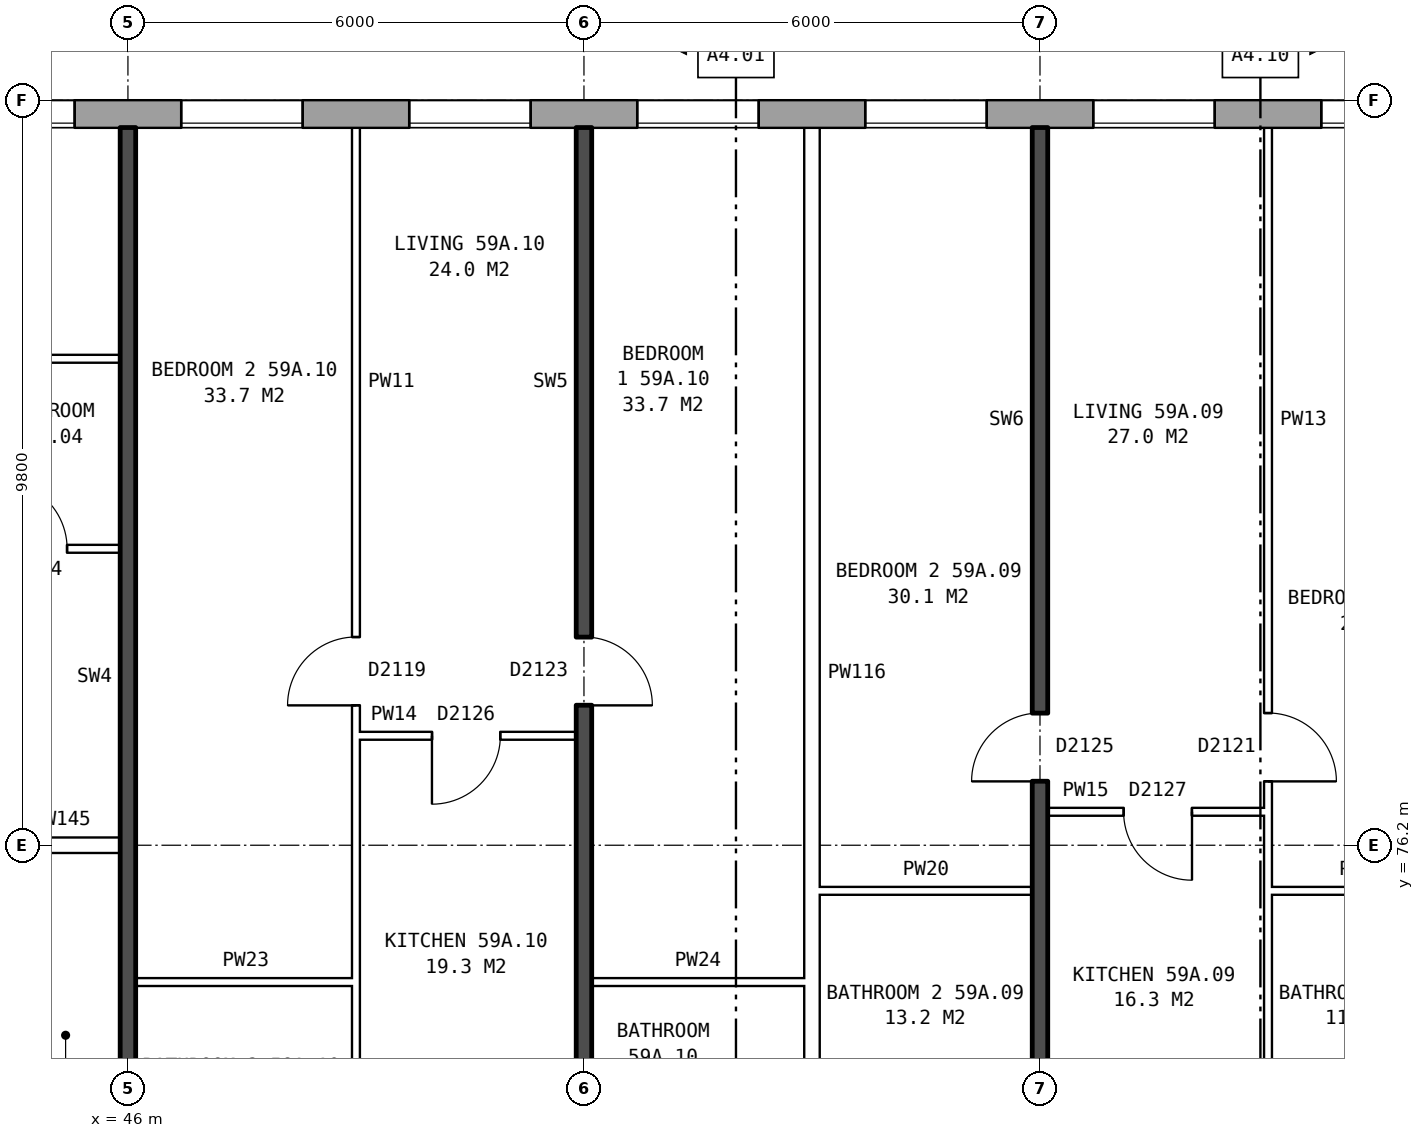
"""IFC4 building model, lengths in metres.
Left out: names, types, materials, properties, quantities, classifications, styles, units other than length and angle.
Written with IfcOpenShell. Run it as: python <this file> out.ifc"""

import sys

from ifc_helpers import new_model, si_unit, direction, frame, frame_2d, origin, place, context, subcontext, project, spatial, rectangle, extrude, element, fill, save


model = new_model("IFC4")
c1 = context("Model", 3, precision=1e-05, world=origin(), true_north=direction((0.0, 1.0)))
c2 = subcontext(c1, "Body", "Model", "MODEL_VIEW")
j1 = project(units=[si_unit("LENGTHUNIT", "METRE"), si_unit("PLANEANGLEUNIT", "RADIAN")], contexts=[c1])
p1 = place(None, origin())
s1 = spatial("IfcSite", under=j1, at=p1, CompositionType="ELEMENT")
p2 = place(p1, origin())
s2 = spatial("IfcBuilding", under=s1, at=p2, CompositionType="ELEMENT")
p3 = place(p2, frame((0.0, 0.0, 209.0)))
s3 = spatial("IfcBuildingStorey", under=s2, at=p3, CompositionType="ELEMENT", Elevation=209.0)
p4 = place(p3, frame((74.95, 85.82, 0.0), z_axis=(0.0, 0.0, 1.0), x_axis=(-1.0, 0.0, 0.0)))
e1 = element("IfcWall", 1, at=p4, inside=s3, PredefinedType="STANDARD", context=c2, shape_type="SweptSolid", body=[
    extrude(rectangle(XDim=39.875, YDim=0.36, at=frame_2d((19.938, 0.0))), origin(), (0.0, 0.0, 1.0), 2.85),
])
p5 = place(p4, frame((0.3, 0.0, 0.8)))
e2 = element("IfcOpeningElement", 2, at=p5, cuts=e1, PredefinedType="OPENING", context=c2, shape_type="SweptSolid", body=[
    extrude(rectangle(XDim=0.8, YDim=1.5, at=frame_2d((0.4, 0.75))), frame((0.0, 0.19, 0.0), z_axis=(0.0, -1.0, 0.0), x_axis=(1.0, 0.0, 0.0)), (0.0, 0.0, 1.0), 0.38),
])
p6 = place(p4, frame((5.65, 0.0, 0.8)))
e3 = element("IfcOpeningElement", 3, at=p6, cuts=e1, PredefinedType="OPENING", context=c2, shape_type="SweptSolid", body=[
    extrude(rectangle(XDim=1.6, YDim=1.8, at=frame_2d((0.8, 0.9))), frame((0.0, 0.19, 0.0), z_axis=(0.0, -1.0, 0.0), x_axis=(1.0, 0.0, 0.0)), (0.0, 0.0, 1.0), 0.38),
])
p7 = place(p4, frame((8.65, 0.0, 0.8)))
e4 = element("IfcOpeningElement", 4, at=p7, cuts=e1, PredefinedType="OPENING", context=c2, shape_type="SweptSolid", body=[
    extrude(rectangle(XDim=1.6, YDim=1.8, at=frame_2d((0.8, 0.9))), frame((0.0, 0.19, 0.0), z_axis=(0.0, -1.0, 0.0), x_axis=(1.0, 0.0, 0.0)), (0.0, 0.0, 1.0), 0.38),
])
p8 = place(p4, frame((11.65, 0.0, 0.8)))
e5 = element("IfcOpeningElement", 5, at=p8, cuts=e1, PredefinedType="OPENING", context=c2, shape_type="SweptSolid", body=[
    extrude(rectangle(XDim=1.6, YDim=1.8, at=frame_2d((0.8, 0.9))), frame((0.0, 0.19, 0.0), z_axis=(0.0, -1.0, 0.0), x_axis=(1.0, 0.0, 0.0)), (0.0, 0.0, 1.0), 0.38),
])
p9 = place(p4, frame((14.65, 0.0, 0.8)))
e6 = element("IfcOpeningElement", 6, at=p9, cuts=e1, PredefinedType="OPENING", context=c2, shape_type="SweptSolid", body=[
    extrude(rectangle(XDim=1.6, YDim=1.8, at=frame_2d((0.8, 0.9))), frame((0.0, 0.19, 0.0), z_axis=(0.0, -1.0, 0.0), x_axis=(1.0, 0.0, 0.0)), (0.0, 0.0, 1.0), 0.38),
])
p10 = place(p4, frame((17.65, 0.0, 0.8)))
e7 = element("IfcOpeningElement", 7, at=p10, cuts=e1, PredefinedType="OPENING", context=c2, shape_type="SweptSolid", body=[
    extrude(rectangle(XDim=1.6, YDim=1.8, at=frame_2d((0.8, 0.9))), frame((0.0, 0.19, 0.0), z_axis=(0.0, -1.0, 0.0), x_axis=(1.0, 0.0, 0.0)), (0.0, 0.0, 1.0), 0.38),
])
p11 = place(p4, frame((20.65, 0.0, 0.8)))
e8 = element("IfcOpeningElement", 8, at=p11, cuts=e1, PredefinedType="OPENING", context=c2, shape_type="SweptSolid", body=[
    extrude(rectangle(XDim=1.6, YDim=1.8, at=frame_2d((0.8, 0.9))), frame((0.0, 0.19, 0.0), z_axis=(0.0, -1.0, 0.0), x_axis=(1.0, 0.0, 0.0)), (0.0, 0.0, 1.0), 0.38),
])
p12 = place(p4, frame((23.65, 0.0, 0.8)))
e9 = element("IfcOpeningElement", 9, at=p12, cuts=e1, PredefinedType="OPENING", context=c2, shape_type="SweptSolid", body=[
    extrude(rectangle(XDim=1.6, YDim=1.8, at=frame_2d((0.8, 0.9))), frame((0.0, 0.19, 0.0), z_axis=(0.0, -1.0, 0.0), x_axis=(1.0, 0.0, 0.0)), (0.0, 0.0, 1.0), 0.38),
])
p13 = place(p4, frame((26.65, 0.0, 0.8)))
e10 = element("IfcOpeningElement", 10, at=p13, cuts=e1, PredefinedType="OPENING", context=c2, shape_type="SweptSolid", body=[
    extrude(rectangle(XDim=1.6, YDim=1.8, at=frame_2d((0.8, 0.9))), frame((0.0, 0.19, 0.0), z_axis=(0.0, -1.0, 0.0), x_axis=(1.0, 0.0, 0.0)), (0.0, 0.0, 1.0), 0.38),
])
p14 = place(p4, frame((29.65, 0.0, 0.8)))
e11 = element("IfcOpeningElement", 11, at=p14, cuts=e1, PredefinedType="OPENING", context=c2, shape_type="SweptSolid", body=[
    extrude(rectangle(XDim=1.6, YDim=1.8, at=frame_2d((0.8, 0.9))), frame((0.0, 0.19, 0.0), z_axis=(0.0, -1.0, 0.0), x_axis=(1.0, 0.0, 0.0)), (0.0, 0.0, 1.0), 0.38),
])
p15 = place(p4, frame((32.65, 0.0, 0.8)))
e12 = element("IfcOpeningElement", 12, at=p15, cuts=e1, PredefinedType="OPENING", context=c2, shape_type="SweptSolid", body=[
    extrude(rectangle(XDim=1.6, YDim=1.8, at=frame_2d((0.8, 0.9))), frame((0.0, 0.19, 0.0), z_axis=(0.0, -1.0, 0.0), x_axis=(1.0, 0.0, 0.0)), (0.0, 0.0, 1.0), 0.38),
])
p16 = place(p4, frame((35.15, 0.0, 0.8)))
e13 = element("IfcOpeningElement", 13, at=p16, cuts=e1, PredefinedType="OPENING", context=c2, shape_type="SweptSolid", body=[
    extrude(rectangle(XDim=1.0, YDim=1.8, at=frame_2d((0.5, 0.9))), frame((0.0, 0.19, 0.0), z_axis=(0.0, -1.0, 0.0), x_axis=(1.0, 0.0, 0.0)), (0.0, 0.0, 1.0), 0.38),
])
p17 = place(p4, frame((1.4, 0.0, 0.8)))
e14 = element("IfcOpeningElement", 14, at=p17, cuts=e1, PredefinedType="OPENING", context=c2, shape_type="SweptSolid", body=[
    extrude(rectangle(XDim=1.4, YDim=1.8, at=frame_2d((0.7, 0.9))), frame((0.0, 0.19, 0.0), z_axis=(0.0, -1.0, 0.0), x_axis=(1.0, 0.0, 0.0)), (0.0, 0.0, 1.0), 0.38),
])
p18 = place(p4, frame((38.55, 0.0, 0.8)))
e15 = element("IfcOpeningElement", 15, at=p18, cuts=e1, PredefinedType="OPENING", context=c2, shape_type="SweptSolid", body=[
    extrude(rectangle(XDim=1.0, YDim=1.8, at=frame_2d((0.5, 0.9))), frame((0.0, 0.19, 0.0), z_axis=(0.0, -1.0, 0.0), x_axis=(1.0, 0.0, 0.0)), (0.0, 0.0, 1.0), 0.38),
])
p19 = place(p3, frame((46.1, 74.4, 0.0), z_axis=(0.0, 0.0, 1.0), x_axis=(1.0, 0.0, 0.0)))
e16 = element("IfcWall", 16, at=p19, inside=s3, PredefinedType="PARTITIONING", context=c2, shape_type="SweptSolid", body=[
    extrude(rectangle(XDim=2.9, YDim=0.1, at=frame_2d((1.45, 0.0))), origin(), (0.0, 0.0, 1.0), 2.85),
])
for number, where, z_axis, x_axis in (
    (17, (52.1, 74.4, 0.0), (0.0, 0.0, 1.0), (1.0, 0.0, 0.0)),
    (18, (55.1, 75.6, 0.0), (0.0, 0.0, 1.0), (1.0, 0.0, 0.0)),
):
    element("IfcWall", number, at=place(p3, frame(where, z_axis=z_axis, x_axis=x_axis)), inside=s3, PredefinedType="PARTITIONING", context=c2, shape_type="SweptSolid", body=[
        extrude(rectangle(XDim=2.8, YDim=0.1, at=frame_2d((1.4, 0.0))), origin(), (0.0, 0.0, 1.0), 2.85),
    ])
p20 = place(p3, frame((61.0, 75.6, 0.0), z_axis=(0.0, 0.0, 1.0), x_axis=(1.0, 0.0, 0.0)))
e19 = element("IfcWall", 19, at=p20, inside=s3, PredefinedType="PARTITIONING", context=c2, shape_type="SweptSolid", body=[
    extrude(rectangle(XDim=2.64, YDim=0.1, at=frame_2d((1.32, 0.0))), origin(), (0.0, 0.0, 1.0), 2.85),
])
p21 = place(p3, frame((44.36, 76.2, 0.0), z_axis=(0.0, 0.0, 1.0), x_axis=(1.0, 0.0, 0.0)))
e20 = element("IfcWall", 20, at=p21, inside=s3, PredefinedType="PARTITIONING", context=c2, shape_type="SweptSolid", body=[
    extrude(rectangle(XDim=1.54, YDim=0.2, at=frame_2d((0.77, 0.0))), origin(), (0.0, 0.0, 1.0), 2.85),
])
p22 = place(p3, frame((58.1, 76.64, 0.0), z_axis=(0.0, 0.0, 1.0), x_axis=(1.0, 0.0, 0.0)))
e21 = element("IfcWall", 21, at=p22, inside=s3, PredefinedType="PARTITIONING", context=c2, shape_type="SweptSolid", body=[
    extrude(rectangle(XDim=2.9, YDim=0.1, at=frame_2d((1.45, 0.0))), origin(), (0.0, 0.0, 1.0), 2.85),
])
p23 = place(p22, frame((1.0, 0.0, 0.0)))
e22 = element("IfcOpeningElement", 22, at=p23, cuts=e21, PredefinedType="OPENING", context=c2, shape_type="SweptSolid", body=[
    extrude(rectangle(XDim=0.9, YDim=2.1, at=frame_2d((0.45, 1.05))), frame((0.0, 0.06, 0.0), z_axis=(0.0, -1.0, 0.0), x_axis=(1.0, 0.0, 0.0)), (0.0, 0.0, 1.0), 0.12),
])
p24 = place(p3, frame((49.0, 77.64, 0.0), z_axis=(0.0, 0.0, 1.0), x_axis=(1.0, 0.0, 0.0)))
e23 = element("IfcWall", 23, at=p24, inside=s3, PredefinedType="PARTITIONING", context=c2, shape_type="SweptSolid", body=[
    extrude(rectangle(XDim=2.9, YDim=0.1, at=frame_2d((1.45, 0.0))), origin(), (0.0, 0.0, 1.0), 2.85),
])
p25 = place(p24, frame((1.0, 0.0, 0.0)))
e24 = element("IfcOpeningElement", 24, at=p25, cuts=e23, PredefinedType="OPENING", context=c2, shape_type="SweptSolid", body=[
    extrude(rectangle(XDim=0.9, YDim=2.1, at=frame_2d((0.45, 1.05))), frame((0.0, 0.06, 0.0), z_axis=(0.0, -1.0, 0.0), x_axis=(1.0, 0.0, 0.0)), (0.0, 0.0, 1.0), 0.12),
])
p26 = place(p3, frame((40.1, 80.1, 0.0), z_axis=(0.0, 0.0, 1.0), x_axis=(1.0, 0.0, 0.0)))
e25 = element("IfcWall", 25, at=p26, inside=s3, PredefinedType="PARTITIONING", context=c2, shape_type="SweptSolid", body=[
    extrude(rectangle(XDim=5.8, YDim=0.1, at=frame_2d((2.9, 0.0))), origin(), (0.0, 0.0, 1.0), 2.85),
])
p27 = place(p26, frame((1.3, 0.0, 0.0)))
e26 = element("IfcOpeningElement", 26, at=p27, cuts=e25, PredefinedType="OPENING", context=c2, shape_type="SweptSolid", body=[
    extrude(rectangle(XDim=0.9, YDim=2.1, at=frame_2d((0.45, 1.05))), frame((0.0, 0.06, 0.0), z_axis=(0.0, -1.0, 0.0), x_axis=(1.0, 0.0, 0.0)), (0.0, 0.0, 1.0), 0.12),
])
p28 = place(p26, frame((4.2, 0.0, 0.0)))
e27 = element("IfcOpeningElement", 27, at=p28, cuts=e25, PredefinedType="OPENING", context=c2, shape_type="SweptSolid", body=[
    extrude(rectangle(XDim=0.9, YDim=2.1, at=frame_2d((0.45, 1.05))), frame((0.0, 0.06, 0.0), z_axis=(0.0, -1.0, 0.0), x_axis=(1.0, 0.0, 0.0)), (0.0, 0.0, 1.0), 0.12),
])
p29 = place(p3, frame((43.6, 82.6, 0.0), z_axis=(0.0, 0.0, 1.0), x_axis=(1.0, 0.0, 0.0)))
e28 = element("IfcWall", 28, at=p29, inside=s3, PredefinedType="PARTITIONING", context=c2, shape_type="SweptSolid", body=[
    extrude(rectangle(XDim=2.3, YDim=0.1, at=frame_2d((1.15, 0.0))), origin(), (0.0, 0.0, 1.0), 2.85),
])
p30 = place(p3, frame((46.0, 71.2, 0.0), z_axis=(0.0, 0.0, 1.0), x_axis=(0.0, 1.0, 0.0)))
e29 = element("IfcWall", 29, at=p30, inside=s3, PredefinedType="SOLIDWALL", context=c2, shape_type="SweptSolid", body=[
    extrude(rectangle(XDim=14.44, YDim=0.2, at=frame_2d((7.22, 0.0))), origin(), (0.0, 0.0, 1.0), 2.85),
])
p31 = place(p3, frame((49.0, 71.3, 0.0), z_axis=(0.0, 0.0, 1.0), x_axis=(0.0, 1.0, 0.0)))
e30 = element("IfcWall", 30, at=p31, inside=s3, PredefinedType="PARTITIONING", context=c2, shape_type="SweptSolid", body=[
    extrude(rectangle(XDim=14.34, YDim=0.1, at=frame_2d((7.17, 0.0))), origin(), (0.0, 0.0, 1.0), 2.85),
])
p32 = place(p31, frame((6.74, 0.0, 0.0)))
e31 = element("IfcOpeningElement", 31, at=p32, cuts=e30, PredefinedType="OPENING", context=c2, shape_type="SweptSolid", body=[
    extrude(rectangle(XDim=0.9, YDim=2.1, at=frame_2d((0.45, 1.05))), frame((0.0, 0.06, 0.0), z_axis=(0.0, -1.0, 0.0), x_axis=(1.0, 0.0, 0.0)), (0.0, 0.0, 1.0), 0.12),
])
p33 = place(p31, frame((0.4, 0.0, 0.0)))
e32 = element("IfcOpeningElement", 32, at=p33, cuts=e30, PredefinedType="OPENING", context=c2, shape_type="SweptSolid", body=[
    extrude(rectangle(XDim=0.9, YDim=2.1, at=frame_2d((0.45, 1.05))), frame((0.0, 0.06, 0.0), z_axis=(0.0, -1.0, 0.0), x_axis=(1.0, 0.0, 0.0)), (0.0, 0.0, 1.0), 0.12),
])
p34 = place(p3, frame((52.0, 71.2, 0.0), z_axis=(0.0, 0.0, 1.0), x_axis=(0.0, 1.0, 0.0)))
e33 = element("IfcWall", 33, at=p34, inside=s3, PredefinedType="SOLIDWALL", context=c2, shape_type="SweptSolid", body=[
    extrude(rectangle(XDim=14.44, YDim=0.2, at=frame_2d((7.22, 0.0))), origin(), (0.0, 0.0, 1.0), 2.85),
])
p35 = place(p34, frame((6.84, 0.0, 0.0)))
e34 = element("IfcOpeningElement", 34, at=p35, cuts=e33, PredefinedType="OPENING", context=c2, shape_type="SweptSolid", body=[
    extrude(rectangle(XDim=0.9, YDim=2.1, at=frame_2d((0.45, 1.05))), frame((0.0, 0.11, 0.0), z_axis=(0.0, -1.0, 0.0), x_axis=(1.0, 0.0, 0.0)), (0.0, 0.0, 1.0), 0.22),
])
p36 = place(p34, frame((0.4, 0.0, 0.0)))
e35 = element("IfcOpeningElement", 35, at=p36, cuts=e33, PredefinedType="OPENING", context=c2, shape_type="SweptSolid", body=[
    extrude(rectangle(XDim=0.9, YDim=2.1, at=frame_2d((0.45, 1.05))), frame((0.0, 0.11, 0.0), z_axis=(0.0, -1.0, 0.0), x_axis=(1.0, 0.0, 0.0)), (0.0, 0.0, 1.0), 0.22),
])
p37 = place(p3, frame((55.0, 71.3, 0.0), z_axis=(0.0, 0.0, 1.0), x_axis=(0.0, 1.0, 0.0)))
e36 = element("IfcWall", 36, at=p37, inside=s3, PredefinedType="PARTITIONING", context=c2, shape_type="SweptSolid", body=[
    extrude(rectangle(XDim=14.34, YDim=0.2, at=frame_2d((7.17, 0.0))), origin(), (0.0, 0.0, 1.0), 2.85),
])
p38 = place(p3, frame((58.0, 71.2, 0.0), z_axis=(0.0, 0.0, 1.0), x_axis=(0.0, 1.0, 0.0)))
e37 = element("IfcWall", 37, at=p38, inside=s3, PredefinedType="SOLIDWALL", context=c2, shape_type="SweptSolid", body=[
    extrude(rectangle(XDim=14.44, YDim=0.2, at=frame_2d((7.22, 0.0))), origin(), (0.0, 0.0, 1.0), 2.85),
])
p39 = place(p38, frame((5.84, 0.0, 0.0)))
e38 = element("IfcOpeningElement", 38, at=p39, cuts=e37, PredefinedType="OPENING", context=c2, shape_type="SweptSolid", body=[
    extrude(rectangle(XDim=0.9, YDim=2.1, at=frame_2d((0.45, 1.05))), frame((0.0, 0.11, 0.0), z_axis=(0.0, -1.0, 0.0), x_axis=(1.0, 0.0, 0.0)), (0.0, 0.0, 1.0), 0.22),
])
p40 = place(p38, frame((0.4, 0.0, 0.0)))
e39 = element("IfcOpeningElement", 39, at=p40, cuts=e37, PredefinedType="OPENING", context=c2, shape_type="SweptSolid", body=[
    extrude(rectangle(XDim=0.9, YDim=2.1, at=frame_2d((0.45, 1.05))), frame((0.0, 0.11, 0.0), z_axis=(0.0, -1.0, 0.0), x_axis=(1.0, 0.0, 0.0)), (0.0, 0.0, 1.0), 0.22),
])
p41 = place(p3, frame((61.0, 71.3, 0.0), z_axis=(0.0, 0.0, 1.0), x_axis=(0.0, 1.0, 0.0)))
e40 = element("IfcWall", 40, at=p41, inside=s3, PredefinedType="PARTITIONING", context=c2, shape_type="SweptSolid", body=[
    extrude(rectangle(XDim=14.34, YDim=0.1, at=frame_2d((7.17, 0.0))), origin(), (0.0, 0.0, 1.0), 2.85),
])
p42 = place(p41, frame((5.74, 0.0, 0.0)))
e41 = element("IfcOpeningElement", 41, at=p42, cuts=e40, PredefinedType="OPENING", context=c2, shape_type="SweptSolid", body=[
    extrude(rectangle(XDim=0.9, YDim=2.1, at=frame_2d((0.45, 1.05))), frame((0.0, 0.06, 0.0), z_axis=(0.0, -1.0, 0.0), x_axis=(1.0, 0.0, 0.0)), (0.0, 0.0, 1.0), 0.12),
])
p43 = place(p41, frame((0.4, 0.0, 0.0)))
e42 = element("IfcOpeningElement", 42, at=p43, cuts=e40, PredefinedType="OPENING", context=c2, shape_type="SweptSolid", body=[
    extrude(rectangle(XDim=0.9, YDim=2.1, at=frame_2d((0.45, 1.05))), frame((0.0, 0.06, 0.0), z_axis=(0.0, -1.0, 0.0), x_axis=(1.0, 0.0, 0.0)), (0.0, 0.0, 1.0), 0.12),
])
p44 = place(p8, origin())
e43 = element("IfcWindow", 43, at=p44, inside=s3, PartitioningType="SINGLE_PANEL", PredefinedType="WINDOW", context=c2, shape_type="SweptSolid", body=[
    extrude(rectangle(XDim=1.6, YDim=1.8, at=frame_2d((0.8, 0.9))), frame((0.0, 0.15, 0.0), z_axis=(0.0, -1.0, 0.0), x_axis=(1.0, 0.0, 0.0)), (0.0, 0.0, 1.0), 0.06),
])
fill(e5, e43)
p45 = place(p9, origin())
e44 = element("IfcWindow", 44, at=p45, inside=s3, PartitioningType="SINGLE_PANEL", PredefinedType="WINDOW", context=c2, shape_type="SweptSolid", body=[
    extrude(rectangle(XDim=1.6, YDim=1.8, at=frame_2d((0.8, 0.9))), frame((0.0, 0.15, 0.0), z_axis=(0.0, -1.0, 0.0), x_axis=(1.0, 0.0, 0.0)), (0.0, 0.0, 1.0), 0.06),
])
fill(e6, e44)
p46 = place(p10, origin())
e45 = element("IfcWindow", 45, at=p46, inside=s3, PartitioningType="SINGLE_PANEL", PredefinedType="WINDOW", context=c2, shape_type="SweptSolid", body=[
    extrude(rectangle(XDim=1.6, YDim=1.8, at=frame_2d((0.8, 0.9))), frame((0.0, 0.15, 0.0), z_axis=(0.0, -1.0, 0.0), x_axis=(1.0, 0.0, 0.0)), (0.0, 0.0, 1.0), 0.06),
])
fill(e7, e45)
p47 = place(p11, origin())
e46 = element("IfcWindow", 46, at=p47, inside=s3, PartitioningType="SINGLE_PANEL", PredefinedType="WINDOW", context=c2, shape_type="SweptSolid", body=[
    extrude(rectangle(XDim=1.6, YDim=1.8, at=frame_2d((0.8, 0.9))), frame((0.0, 0.15, 0.0), z_axis=(0.0, -1.0, 0.0), x_axis=(1.0, 0.0, 0.0)), (0.0, 0.0, 1.0), 0.06),
])
fill(e8, e46)
p48 = place(p12, origin())
e47 = element("IfcWindow", 47, at=p48, inside=s3, PartitioningType="SINGLE_PANEL", PredefinedType="WINDOW", context=c2, shape_type="SweptSolid", body=[
    extrude(rectangle(XDim=1.6, YDim=1.8, at=frame_2d((0.8, 0.9))), frame((0.0, 0.15, 0.0), z_axis=(0.0, -1.0, 0.0), x_axis=(1.0, 0.0, 0.0)), (0.0, 0.0, 1.0), 0.06),
])
fill(e9, e47)
p49 = place(p13, origin())
e48 = element("IfcWindow", 48, at=p49, inside=s3, PartitioningType="SINGLE_PANEL", PredefinedType="WINDOW", context=c2, shape_type="SweptSolid", body=[
    extrude(rectangle(XDim=1.6, YDim=1.8, at=frame_2d((0.8, 0.9))), frame((0.0, 0.15, 0.0), z_axis=(0.0, -1.0, 0.0), x_axis=(1.0, 0.0, 0.0)), (0.0, 0.0, 1.0), 0.06),
])
fill(e10, e48)
p50 = place(p14, origin())
e49 = element("IfcWindow", 49, at=p50, inside=s3, PartitioningType="SINGLE_PANEL", PredefinedType="WINDOW", context=c2, shape_type="SweptSolid", body=[
    extrude(rectangle(XDim=1.6, YDim=1.8, at=frame_2d((0.8, 0.9))), frame((0.0, 0.15, 0.0), z_axis=(0.0, -1.0, 0.0), x_axis=(1.0, 0.0, 0.0)), (0.0, 0.0, 1.0), 0.06),
])
fill(e11, e49)
p51 = place(p28, origin())
e50 = element("IfcDoor", 50, at=p51, inside=s3, OperationType="SINGLE_SWING_LEFT", PredefinedType="DOOR", context=c2, shape_type="SweptSolid", body=[
    extrude(rectangle(XDim=0.9, YDim=2.1, at=frame_2d((0.45, 1.05))), frame((0.0, 0.025, 0.0), z_axis=(0.0, -1.0, 0.0), x_axis=(1.0, 0.0, 0.0)), (0.0, 0.0, 1.0), 0.05),
])
fill(e27, e50)
p52 = place(p42, frame((0.9, 0.0, 0.0), z_axis=(0.0, 0.0, 1.0), x_axis=(-1.0, 0.0, 0.0)))
e51 = element("IfcDoor", 51, at=p52, inside=s3, OperationType="SINGLE_SWING_RIGHT", PredefinedType="DOOR", context=c2, shape_type="SweptSolid", body=[
    extrude(rectangle(XDim=0.9, YDim=2.1, at=frame_2d((0.45, 1.05))), frame((0.0, 0.025, 0.0), z_axis=(0.0, -1.0, 0.0), x_axis=(1.0, 0.0, 0.0)), (0.0, 0.0, 1.0), 0.05),
])
fill(e41, e51)
p53 = place(p39, origin())
e52 = element("IfcDoor", 52, at=p53, inside=s3, OperationType="SINGLE_SWING_LEFT", PredefinedType="DOOR", context=c2, shape_type="SweptSolid", body=[
    extrude(rectangle(XDim=0.9, YDim=2.1, at=frame_2d((0.45, 1.05))), frame((0.0, 0.025, 0.0), z_axis=(0.0, -1.0, 0.0), x_axis=(1.0, 0.0, 0.0)), (0.0, 0.0, 1.0), 0.05),
])
fill(e38, e52)
p54 = place(p23, frame((0.9, 0.0, 0.0), z_axis=(0.0, 0.0, 1.0), x_axis=(-1.0, 0.0, 0.0)))
e53 = element("IfcDoor", 53, at=p54, inside=s3, OperationType="SINGLE_SWING_LEFT", PredefinedType="DOOR", context=c2, shape_type="SweptSolid", body=[
    extrude(rectangle(XDim=0.9, YDim=2.1, at=frame_2d((0.45, 1.05))), frame((0.0, 0.025, 0.0), z_axis=(0.0, -1.0, 0.0), x_axis=(1.0, 0.0, 0.0)), (0.0, 0.0, 1.0), 0.05),
])
fill(e22, e53)
p55 = place(p35, frame((0.9, 0.0, 0.0), z_axis=(0.0, 0.0, 1.0), x_axis=(-1.0, 0.0, 0.0)))
e54 = element("IfcDoor", 54, at=p55, inside=s3, OperationType="SINGLE_SWING_RIGHT", PredefinedType="DOOR", context=c2, shape_type="SweptSolid", body=[
    extrude(rectangle(XDim=0.9, YDim=2.1, at=frame_2d((0.45, 1.05))), frame((0.0, 0.025, 0.0), z_axis=(0.0, -1.0, 0.0), x_axis=(1.0, 0.0, 0.0)), (0.0, 0.0, 1.0), 0.05),
])
fill(e34, e54)
p56 = place(p32, origin())
e55 = element("IfcDoor", 55, at=p56, inside=s3, OperationType="SINGLE_SWING_LEFT", PredefinedType="DOOR", context=c2, shape_type="SweptSolid", body=[
    extrude(rectangle(XDim=0.9, YDim=2.1, at=frame_2d((0.45, 1.05))), frame((0.0, 0.025, 0.0), z_axis=(0.0, -1.0, 0.0), x_axis=(1.0, 0.0, 0.0)), (0.0, 0.0, 1.0), 0.05),
])
fill(e31, e55)
p57 = place(p25, frame((0.9, 0.0, 0.0), z_axis=(0.0, 0.0, 1.0), x_axis=(-1.0, 0.0, 0.0)))
e56 = element("IfcDoor", 56, at=p57, inside=s3, OperationType="SINGLE_SWING_RIGHT", PredefinedType="DOOR", context=c2, shape_type="SweptSolid", body=[
    extrude(rectangle(XDim=0.9, YDim=2.1, at=frame_2d((0.45, 1.05))), frame((0.0, 0.025, 0.0), z_axis=(0.0, -1.0, 0.0), x_axis=(1.0, 0.0, 0.0)), (0.0, 0.0, 1.0), 0.05),
])
fill(e24, e56)
save(model, sys.argv[1])
